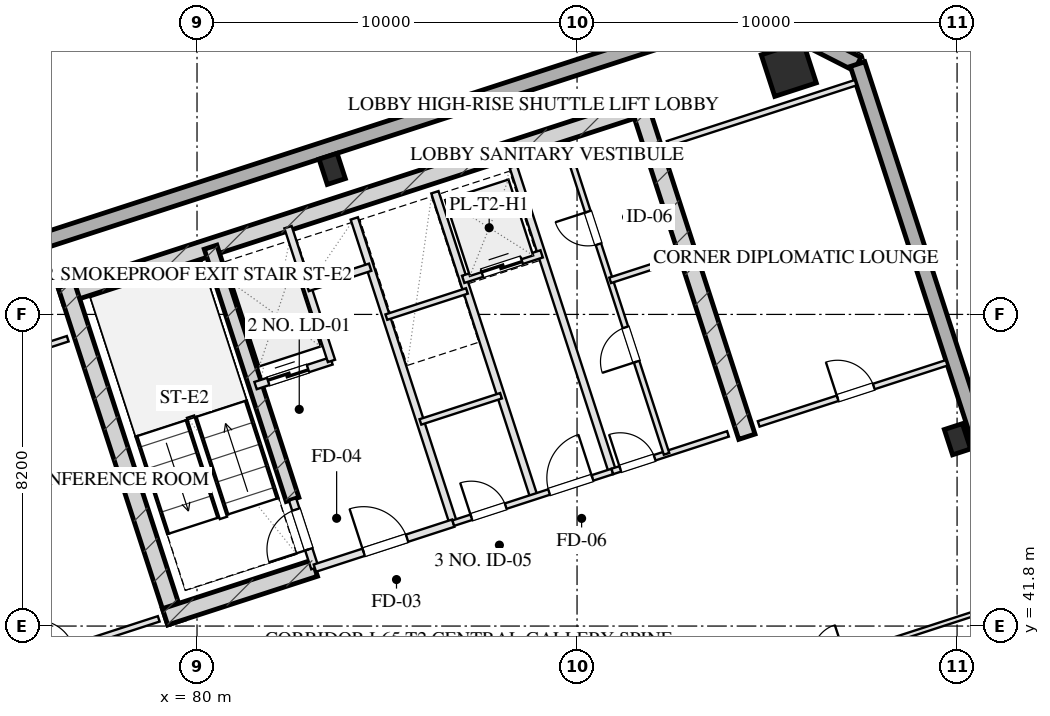
"""IFC4 building model, lengths in metres.
Left out: names, types, materials, properties, quantities, classifications, styles, units other than length and angle.
Written with IfcOpenShell. Run it as: python <this file> out.ifc"""

import sys

from ifc_helpers import new_model, si_unit, direction, frame, frame_2d, origin, origin_2d, place, context, subcontext, project, spatial, rectangle, hollow_rectangle, extrude, element, fill, save


model = new_model("IFC4")
c1 = context("Model", 3, precision=1e-05, world=origin(), true_north=direction((0.0, 1.0)))
c2 = subcontext(c1, "Body", "Model", "MODEL_VIEW")
j1 = project(units=[si_unit("LENGTHUNIT", "METRE"), si_unit("PLANEANGLEUNIT", "RADIAN")], contexts=[c1])
p1 = place(None, origin())
s1 = spatial("IfcSite", under=j1, at=p1, CompositionType="ELEMENT")
p2 = place(p1, origin())
s2 = spatial("IfcBuilding", under=s1, at=p2, CompositionType="ELEMENT")
p3 = place(p2, frame((0.0, 0.0, 240.8)))
s3 = spatial("IfcBuildingStorey", under=s2, at=p3, CompositionType="ELEMENT", Elevation=240.8)
p4 = place(p3, frame((76.415, 50.489, 0.0), z_axis=(0.0, 0.0, 1.0), x_axis=(0.951056810414, 0.309016089169, 0.0)))
e1 = element("IfcWall", 1, at=p4, inside=s3, PredefinedType="SHEAR", context=c2, shape_type="SweptSolid", body=[
    extrude(rectangle(XDim=16.25, YDim=0.45, at=frame_2d((8.125, 0.0))), origin(), (0.0, 0.0, 1.0), 3.2),
])
for number, where, z_axis, x_axis in (
    (2, (79.442, 41.899, 0.0), (0.0, 0.0, 1.0), (-0.309, 0.951, 0.0)),
    (3, (94.469, 46.781, 0.0), (0.0, 0.0, 1.0), (-0.309, 0.951, 0.0)),
):
    element("IfcWall", number, at=place(p3, frame(where, z_axis=z_axis, x_axis=x_axis)), inside=s3, PredefinedType="SHEAR", context=c2, shape_type="SweptSolid", body=[
        extrude(rectangle(XDim=9.33, YDim=0.45, at=frame_2d((4.665, 0.0))), origin(), (0.0, 0.0, 1.0), 3.2),
    ])
p5 = place(p3, frame((82.514, 45.131, 0.0), z_axis=(0.0, 0.0, 1.0), x_axis=(-0.308988790936, 0.951065679686, 0.0)))
e4 = element("IfcWall", 4, at=p5, inside=s3, PredefinedType="SHEAR", context=c2, shape_type="SweptSolid", body=[
    extrude(rectangle(XDim=6.98, YDim=0.35, at=frame_2d((3.49, 0.0))), origin(), (0.0, 0.0, 1.0), 3.2),
])
p6 = place(p3, frame((79.159, 42.043, 0.0), z_axis=(0.0, 0.0, 1.0), x_axis=(0.951047485828, 0.309044785913, 0.0)))
e5 = element("IfcWall", 5, at=p6, inside=s3, PredefinedType="SHEAR", context=c2, shape_type="SweptSolid", body=[
    extrude(rectangle(XDim=4.145, YDim=0.45, at=frame_2d((2.073, 0.0))), origin(), (0.0, 0.0, 1.0), 3.2),
])
p7 = place(p3, frame((95.572, 56.461, 0.0), z_axis=(0.0, 0.0, 1.0), x_axis=(0.951056516295, 0.309016994375, 0.0)))
e6 = element("IfcColumn", 6, at=p7, inside=s3, PredefinedType="COLUMN", context=c2, shape_type="SweptSolid", body=[
    extrude(hollow_rectangle(XDim=1.15, YDim=1.15, WallThickness=0.04, at=origin_2d()), origin(), (0.0, 0.0, 1.0), 3.201),
])
for number, where, z_axis, x_axis in (
    (7, (100.01, 46.716, 0.0), (0.0, 0.0, 1.0), (0.951, 0.309, 0.0)),
    (8, (83.557, 53.83, 0.0), (0.0, 0.0, 1.0), (0.951, 0.309, 0.0)),
):
    element("IfcColumn", number, at=place(p3, frame(where, z_axis=z_axis, x_axis=x_axis)), inside=s3, PredefinedType="COLUMN", context=c2, shape_type="SweptSolid", body=[
        extrude(hollow_rectangle(XDim=0.5, YDim=0.7, WallThickness=0.025, at=origin_2d()), origin(), (0.0, 0.0, 1.0), 3.201),
    ])
p8 = place(p3, frame((82.618, 11.414, 0.0), z_axis=(0.0, 0.0, 1.0), x_axis=(-0.309016491071, 0.951056679828, 0.0)))
e9 = element("IfcWall", 9, at=p8, inside=s3, PredefinedType="SOLIDWALL", context=c2, shape_type="SweptSolid", body=[
    extrude(rectangle(XDim=38.4, YDim=0.4, at=frame_2d((19.2, 0.0))), origin(), (0.0, 0.0, 1.0), 2.36),
])
p9 = place(p8, frame((11.825, 0.0, 0.75)))
e10 = element("IfcOpeningElement", 10, at=p9, cuts=e9, PredefinedType="OPENING", context=c2, shape_type="SweptSolid", body=[
    extrude(rectangle(XDim=1.95, YDim=1.21, at=frame_2d((0.975, 0.605))), frame((0.0, 0.21, 0.0), z_axis=(0.0, -1.0, 0.0), x_axis=(1.0, 0.0, 0.0)), (0.0, 0.0, 1.0), 0.42),
])
p10 = place(p8, frame((15.625, 0.0, 0.75)))
e11 = element("IfcOpeningElement", 11, at=p10, cuts=e9, PredefinedType="OPENING", context=c2, shape_type="SweptSolid", body=[
    extrude(rectangle(XDim=1.95, YDim=1.21, at=frame_2d((0.975, 0.605))), frame((0.0, 0.21, 0.0), z_axis=(0.0, -1.0, 0.0), x_axis=(1.0, 0.0, 0.0)), (0.0, 0.0, 1.0), 0.42),
])
p11 = place(p8, frame((21.5, 0.0, 0.0)))
e12 = element("IfcOpeningElement", 12, at=p11, cuts=e9, PredefinedType="OPENING", context=c2, shape_type="SweptSolid", body=[
    extrude(rectangle(XDim=1.1, YDim=2.15, at=frame_2d((0.55, 1.075))), frame((0.0, 0.21, 0.0), z_axis=(0.0, -1.0, 0.0), x_axis=(1.0, 0.0, 0.0)), (0.0, 0.0, 1.0), 0.42),
])
p12 = place(p3, frame((72.165, 50.706, 0.0), z_axis=(0.0, 0.0, 1.0), x_axis=(0.951058012937, 0.309012388148, 0.0)))
e13 = element("IfcWall", 13, at=p12, inside=s3, PredefinedType="SOLIDWALL", context=c2, shape_type="SweptSolid", body=[
    extrude(rectangle(XDim=23.6, YDim=0.4, at=frame_2d((11.8, 0.0))), origin(), (0.0, 0.0, 1.0), 2.36),
])
p13 = place(p3, frame((94.61, 57.999, 0.0), z_axis=(0.0, 0.0, 1.0), x_axis=(0.890979603174, -0.454043331334, 0.0)))
e14 = element("IfcWall", 14, at=p13, inside=s3, PredefinedType="SOLIDWALL", context=c2, shape_type="SweptSolid", body=[
    extrude(rectangle(XDim=3.111, YDim=0.4, at=frame_2d((1.556, 0.0))), origin(), (0.0, 0.0, 1.0), 2.36),
])
p14 = place(p3, frame((97.382, 56.586, 0.0), z_axis=(0.0, 0.0, 1.0), x_axis=(0.309016491071, -0.951056679828, 0.0)))
e15 = element("IfcWall", 15, at=p14, inside=s3, PredefinedType="SOLIDWALL", context=c2, shape_type="SweptSolid", body=[
    extrude(rectangle(XDim=38.4, YDim=0.4, at=frame_2d((19.2, 0.0))), origin(), (0.0, 0.0, 1.0), 2.36),
])
p15 = place(p14, frame((24.625, 0.0, 0.75)))
e16 = element("IfcOpeningElement", 16, at=p15, cuts=e15, PredefinedType="OPENING", context=c2, shape_type="SweptSolid", body=[
    extrude(rectangle(XDim=1.95, YDim=1.21, at=frame_2d((0.975, 0.605))), frame((0.0, 0.21, 0.0), z_axis=(0.0, -1.0, 0.0), x_axis=(1.0, 0.0, 0.0)), (0.0, 0.0, 1.0), 0.42),
])
p16 = place(p14, frame((20.825, 0.0, 0.75)))
e17 = element("IfcOpeningElement", 17, at=p16, cuts=e15, PredefinedType="OPENING", context=c2, shape_type="SweptSolid", body=[
    extrude(rectangle(XDim=1.95, YDim=1.21, at=frame_2d((0.975, 0.605))), frame((0.0, 0.21, 0.0), z_axis=(0.0, -1.0, 0.0), x_axis=(1.0, 0.0, 0.0)), (0.0, 0.0, 1.0), 0.42),
])
p17 = place(p14, frame((15.8, 0.0, 0.0)))
e18 = element("IfcOpeningElement", 18, at=p17, cuts=e15, PredefinedType="OPENING", context=c2, shape_type="SweptSolid", body=[
    extrude(rectangle(XDim=1.1, YDim=2.15, at=frame_2d((0.55, 1.075))), frame((0.0, 0.21, 0.0), z_axis=(0.0, -1.0, 0.0), x_axis=(1.0, 0.0, 0.0)), (0.0, 0.0, 1.0), 0.42),
])
p18 = place(p3, frame((83.101, 43.324, 0.0), z_axis=(0.0, 0.0, 1.0), x_axis=(-0.309048298632, 0.951046344356, 0.0)))
e19 = element("IfcWall", 19, at=p18, inside=s3, PredefinedType="PARTITIONING", context=c2, shape_type="SweptSolid", body=[
    extrude(rectangle(XDim=1.9, YDim=0.2, at=frame_2d((0.95, 0.0))), origin(), (0.0, 0.0, 1.0), 2.925),
])
p19 = place(p18, frame((0.52, 0.0, 0.0)))
e20 = element("IfcOpeningElement", 20, at=p19, cuts=e19, PredefinedType="OPENING", context=c2, shape_type="SweptSolid", body=[
    extrude(rectangle(XDim=1.1, YDim=2.05, at=frame_2d((0.55, 1.025))), frame((0.0, 0.11, 0.0), z_axis=(0.0, -1.0, 0.0), x_axis=(1.0, 0.0, 0.0)), (0.0, 0.0, 1.0), 0.22),
])
p20 = place(p3, frame((86.743, 44.508, 0.0), z_axis=(0.0, 0.0, 1.0), x_axis=(-0.309016001439, 0.951056838919, 0.0)))
e21 = element("IfcWall", 21, at=p20, inside=s3, PredefinedType="PARTITIONING", context=c2, shape_type="SweptSolid", body=[
    extrude(rectangle(XDim=8.43, YDim=0.2, at=frame_2d((4.215, 0.0))), origin(), (0.0, 0.0, 1.0), 2.925),
])
p21 = place(p3, frame((83.101, 43.324, 0.0), z_axis=(0.0, 0.0, 1.0), x_axis=(0.951052804469, 0.309028417967, 0.0)))
e22 = element("IfcWall", 22, at=p21, inside=s3, PredefinedType="PARTITIONING", context=c2, shape_type="SweptSolid", body=[
    extrude(rectangle(XDim=3.83, YDim=0.2, at=frame_2d((1.915, 0.0))), origin(), (0.0, 0.0, 1.0), 2.925),
])
p22 = place(p21, frame((1.35, 0.0, 0.0)))
e23 = element("IfcOpeningElement", 23, at=p22, cuts=e22, PredefinedType="OPENING", context=c2, shape_type="SweptSolid", body=[
    extrude(rectangle(XDim=1.2, YDim=2.05, at=frame_2d((0.6, 1.025))), frame((0.0, 0.11, 0.0), z_axis=(0.0, -1.0, 0.0), x_axis=(1.0, 0.0, 0.0)), (0.0, 0.0, 1.0), 0.22),
])
p23 = place(p3, frame((81.54, 48.127, 0.0), z_axis=(0.0, 0.0, 1.0), x_axis=(0.951062257173, 0.308999325213, 0.0)))
e24 = element("IfcWall", 24, at=p23, inside=s3, PredefinedType="PARTITIONING", context=c2, shape_type="SweptSolid", body=[
    extrude(rectangle(XDim=2.1, YDim=0.2, at=frame_2d((1.05, 0.0))), origin(), (0.0, 0.0, 1.0), 2.925),
])
p24 = place(p23, frame((0.35, 0.0, 0.0)))
e25 = element("IfcOpeningElement", 25, at=p24, cuts=e24, PredefinedType="OPENING", context=c2, shape_type="SweptSolid", body=[
    extrude(rectangle(XDim=1.1, YDim=2.05, at=frame_2d((0.55, 1.025))), frame((0.0, 0.11, 0.0), z_axis=(0.0, -1.0, 0.0), x_axis=(1.0, 0.0, 0.0)), (0.0, 0.0, 1.0), 0.22),
])
p25 = place(p3, frame((83.538, 48.776, 0.0), z_axis=(0.0, 0.0, 1.0), x_axis=(-0.3089935693, 0.951064127245, 0.0)))
e26 = element("IfcWall", 26, at=p25, inside=s3, PredefinedType="PARTITIONING", context=c2, shape_type="SweptSolid", body=[
    extrude(rectangle(XDim=3.7, YDim=0.2, at=frame_2d((1.85, 0.0))), origin(), (0.0, 0.0, 1.0), 2.925),
])
p26 = place(p3, frame((82.91, 50.707, 0.0), z_axis=(0.0, 0.0, 1.0), x_axis=(0.951041328149, 0.309063734775, 0.0)))
e27 = element("IfcWall", 27, at=p26, inside=s3, PredefinedType="PARTITIONING", context=c2, shape_type="SweptSolid", body=[
    extrude(rectangle(XDim=1.73, YDim=0.2, at=frame_2d((0.865, 0.0))), origin(), (0.0, 0.0, 1.0), 2.925),
])
p27 = place(p3, frame((90.928, 45.868, 0.0), z_axis=(0.0, 0.0, 1.0), x_axis=(-0.309042196757, 0.951048327176, 0.0)))
e28 = element("IfcWall", 28, at=p27, inside=s3, PredefinedType="PARTITIONING", context=c2, shape_type="SweptSolid", body=[
    extrude(rectangle(XDim=8.43, YDim=0.2, at=frame_2d((4.215, 0.0))), origin(), (0.0, 0.0, 1.0), 2.925),
])
p28 = place(p3, frame((88.864, 45.197, 0.0), z_axis=(0.0, 0.0, 1.0), x_axis=(-0.309007490203, 0.951059604335, 0.0)))
e29 = element("IfcWall", 29, at=p28, inside=s3, PredefinedType="PARTITIONING", context=c2, shape_type="SweptSolid", body=[
    extrude(rectangle(XDim=8.43, YDim=0.2, at=frame_2d((4.215, 0.0))), origin(), (0.0, 0.0, 1.0), 2.925),
])
p29 = place(p3, frame((86.743, 44.508, 0.0), z_axis=(0.0, 0.0, 1.0), x_axis=(0.951063829732, 0.308994485023, 0.0)))
e30 = element("IfcWall", 30, at=p29, inside=s3, PredefinedType="PARTITIONING", context=c2, shape_type="SweptSolid", body=[
    extrude(rectangle(XDim=4.4, YDim=0.15, at=frame_2d((2.2, 0.0))), origin(), (0.0, 0.0, 1.0), 2.925),
])
p30 = place(p29, frame((0.5, 0.0, 0.0)))
e31 = element("IfcOpeningElement", 31, at=p30, cuts=e30, PredefinedType="OPENING", context=c2, shape_type="SweptSolid", body=[
    extrude(rectangle(XDim=0.95, YDim=2.05, at=frame_2d((0.475, 1.025))), frame((0.0, 0.085, 0.0), z_axis=(0.0, -1.0, 0.0), x_axis=(1.0, 0.0, 0.0)), (0.0, 0.0, 1.0), 0.17),
])
p31 = place(p29, frame((2.65, 0.0, 0.0)))
e32 = element("IfcOpeningElement", 32, at=p31, cuts=e30, PredefinedType="OPENING", context=c2, shape_type="SweptSolid", body=[
    extrude(rectangle(XDim=1.2, YDim=2.05, at=frame_2d((0.6, 1.025))), frame((0.0, 0.085, 0.0), z_axis=(0.0, -1.0, 0.0), x_axis=(1.0, 0.0, 0.0)), (0.0, 0.0, 1.0), 0.17),
])
for number, where, z_axis, x_axis in (
    (33, (85.878, 47.171, 0.0), (0.0, 0.0, 1.0), (0.951, 0.309, 0.0)),
    (34, (84.982, 49.929, 0.0), (0.0, 0.0, 1.0), (0.951, 0.309, 0.0)),
):
    element("IfcWall", number, at=place(p3, frame(where, z_axis=z_axis, x_axis=x_axis)), inside=s3, PredefinedType="PARTITIONING", context=c2, shape_type="SweptSolid", body=[
        extrude(rectangle(XDim=2.23, YDim=0.15, at=frame_2d((1.115, 0.0))), origin(), (0.0, 0.0, 1.0), 2.925),
    ])
p32 = place(p3, frame((87.004, 50.922, 0.0), z_axis=(0.0, 0.0, 1.0), x_axis=(0.951041509718, 0.309063176055, 0.0)))
e35 = element("IfcWall", 35, at=p32, inside=s3, PredefinedType="PARTITIONING", context=c2, shape_type="SweptSolid", body=[
    extrude(rectangle(XDim=2.17, YDim=0.2, at=frame_2d((1.085, 0.0))), origin(), (0.0, 0.0, 1.0), 2.925),
])
p33 = place(p32, frame((0.52, 0.0, 0.0)))
e36 = element("IfcOpeningElement", 36, at=p33, cuts=e35, PredefinedType="OPENING", context=c2, shape_type="SweptSolid", body=[
    extrude(rectangle(XDim=1.1, YDim=2.05, at=frame_2d((0.55, 1.025))), frame((0.0, 0.11, 0.0), z_axis=(0.0, -1.0, 0.0), x_axis=(1.0, 0.0, 0.0)), (0.0, 0.0, 1.0), 0.22),
])
p34 = place(p3, frame((90.928, 45.868, 0.0), z_axis=(0.0, 0.0, 1.0), x_axis=(0.951059297078, 0.309008435874, 0.0)))
e37 = element("IfcWall", 37, at=p34, inside=s3, PredefinedType="PARTITIONING", context=c2, shape_type="SweptSolid", body=[
    extrude(rectangle(XDim=3.2, YDim=0.15, at=frame_2d((1.6, 0.0))), origin(), (0.0, 0.0, 1.0), 2.925),
])
p35 = place(p34, frame((0.22, 0.0, 0.0)))
e38 = element("IfcOpeningElement", 38, at=p35, cuts=e37, PredefinedType="OPENING", context=c2, shape_type="SweptSolid", body=[
    extrude(rectangle(XDim=0.95, YDim=2.05, at=frame_2d((0.475, 1.025))), frame((0.0, 0.085, 0.0), z_axis=(0.0, -1.0, 0.0), x_axis=(1.0, 0.0, 0.0)), (0.0, 0.0, 1.0), 0.17),
])
p36 = place(p3, frame((92.355, 46.331, 0.0), z_axis=(0.0, 0.0, 1.0), x_axis=(-0.309007490203, 0.951059604335, 0.0)))
e39 = element("IfcWall", 39, at=p36, inside=s3, PredefinedType="PARTITIONING", context=c2, shape_type="SweptSolid", body=[
    extrude(rectangle(XDim=8.43, YDim=0.15, at=frame_2d((4.215, 0.0))), origin(), (0.0, 0.0, 1.0), 2.925),
])
p37 = place(p36, frame((2.55, 0.0, 0.0)))
e40 = element("IfcOpeningElement", 40, at=p37, cuts=e39, PredefinedType="OPENING", context=c2, shape_type="SweptSolid", body=[
    extrude(rectangle(XDim=0.95, YDim=2.05, at=frame_2d((0.475, 1.025))), frame((0.0, 0.085, 0.0), z_axis=(0.0, -1.0, 0.0), x_axis=(1.0, 0.0, 0.0)), (0.0, 0.0, 1.0), 0.17),
])
p38 = place(p36, frame((5.8, 0.0, 0.0)))
e41 = element("IfcOpeningElement", 41, at=p38, cuts=e39, PredefinedType="OPENING", context=c2, shape_type="SweptSolid", body=[
    extrude(rectangle(XDim=0.9, YDim=2.05, at=frame_2d((0.45, 1.025))), frame((0.0, 0.085, 0.0), z_axis=(0.0, -1.0, 0.0), x_axis=(1.0, 0.0, 0.0)), (0.0, 0.0, 1.0), 0.17),
])
p39 = place(p3, frame((90.871, 50.896, 0.0), z_axis=(0.0, 0.0, 1.0), x_axis=(0.951054116971, 0.309024378638, 0.0)))
e42 = element("IfcWall", 42, at=p39, inside=s3, PredefinedType="PARTITIONING", context=c2, shape_type="SweptSolid", body=[
    extrude(rectangle(XDim=1.7, YDim=0.15, at=frame_2d((0.85, 0.0))), origin(), (0.0, 0.0, 1.0), 2.925),
])
p40 = place(p3, frame((71.081, 47.568, 0.0), z_axis=(0.0, 0.0, 1.0), x_axis=(0.951059431056, 0.309008023519, 0.0)))
e43 = element("IfcWall", 43, at=p40, inside=s3, PredefinedType="PARTITIONING", context=c2, shape_type="SweptSolid", body=[
    extrude(rectangle(XDim=5.8, YDim=0.15, at=frame_2d((2.9, 0.0))), origin(), (0.0, 0.0, 1.0), 2.925),
])
p41 = place(p3, frame((73.476, 40.197, 0.0), z_axis=(0.0, 0.0, 1.0), x_axis=(0.951059431056, 0.309008023519, 0.0)))
e44 = element("IfcWall", 44, at=p41, inside=s3, PredefinedType="PARTITIONING", context=c2, shape_type="SweptSolid", body=[
    extrude(rectangle(XDim=5.8, YDim=0.15, at=frame_2d((2.9, 0.0))), origin(), (0.0, 0.0, 1.0), 2.925),
])
p42 = place(p41, frame((2.436, 0.0, 0.0)))
e45 = element("IfcOpeningElement", 45, at=p42, cuts=e44, PredefinedType="OPENING", context=c2, shape_type="SweptSolid", body=[
    extrude(rectangle(XDim=1.0, YDim=2.05, at=frame_2d((0.5, 1.025))), frame((0.0, 0.085, 0.0), z_axis=(0.0, -1.0, 0.0), x_axis=(1.0, 0.0, 0.0)), (0.0, 0.0, 1.0), 0.17),
])
p43 = place(p3, frame((92.385, 54.49, 0.0), z_axis=(0.0, 0.0, 1.0), x_axis=(0.951055112834, 0.309021313752, 0.0)))
e46 = element("IfcWall", 46, at=p43, inside=s3, PredefinedType="PARTITIONING", context=c2, shape_type="SweptSolid", body=[
    extrude(rectangle(XDim=5.2, YDim=0.15, at=frame_2d((2.6, 0.0))), origin(), (0.0, 0.0, 1.0), 2.925),
])
p44 = place(p3, frame((94.78, 47.119, 0.0), z_axis=(0.0, 0.0, 1.0), x_axis=(0.951055112834, 0.309021313752, 0.0)))
e47 = element("IfcWall", 47, at=p44, inside=s3, PredefinedType="PARTITIONING", context=c2, shape_type="SweptSolid", body=[
    extrude(rectangle(XDim=5.2, YDim=0.15, at=frame_2d((2.6, 0.0))), origin(), (0.0, 0.0, 1.0), 2.925),
])
p45 = place(p44, frame((2.184, 0.0, 0.0)))
e48 = element("IfcOpeningElement", 48, at=p45, cuts=e47, PredefinedType="OPENING", context=c2, shape_type="SweptSolid", body=[
    extrude(rectangle(XDim=1.0, YDim=2.05, at=frame_2d((0.5, 1.025))), frame((0.0, 0.085, 0.0), z_axis=(0.0, -1.0, 0.0), x_axis=(1.0, 0.0, 0.0)), (0.0, 0.0, 1.0), 0.17),
])
p46 = place(p3, frame((87.825, 38.025, 0.0), z_axis=(0.0, 0.0, 1.0), x_axis=(0.951058110432, 0.309012088082, 0.0)))
e49 = element("IfcWall", 49, at=p46, inside=s3, PredefinedType="PARTITIONING", context=c2, shape_type="SweptSolid", body=[
    extrude(rectangle(XDim=14.625, YDim=0.12, at=frame_2d((7.312, 0.0))), origin(), (0.0, 0.0, 1.0), 2.925),
])
p47 = place(p46, frame((8.845, 0.0, 0.0)))
e50 = element("IfcOpeningElement", 50, at=p47, cuts=e49, PredefinedType="OPENING", context=c2, shape_type="SweptSolid", body=[
    extrude(rectangle(XDim=0.85, YDim=2.05, at=frame_2d((0.425, 1.025))), frame((0.0, 0.07, 0.0), z_axis=(0.0, -1.0, 0.0), x_axis=(1.0, 0.0, 0.0)), (0.0, 0.0, 1.0), 0.14),
])
p48 = place(p19, origin())
e51 = element("IfcDoor", 51, at=p48, inside=s3, OperationType="SINGLE_SWING_LEFT", PredefinedType="DOOR", context=c2, shape_type="SweptSolid", body=[
    extrude(rectangle(XDim=1.1, YDim=2.05, at=frame_2d((0.55, 1.025))), frame((0.0, 0.025, 0.0), z_axis=(0.0, -1.0, 0.0), x_axis=(1.0, 0.0, 0.0)), (0.0, 0.0, 1.0), 0.05),
])
fill(e20, e51)
p49 = place(p22, origin())
e52 = element("IfcDoor", 52, at=p49, inside=s3, OperationType="SINGLE_SWING_LEFT", PredefinedType="DOOR", context=c2, shape_type="SweptSolid", body=[
    extrude(rectangle(XDim=1.2, YDim=2.05, at=frame_2d((0.6, 1.025))), frame((0.0, 0.025, 0.0), z_axis=(0.0, -1.0, 0.0), x_axis=(1.0, 0.0, 0.0)), (0.0, 0.0, 1.0), 0.05),
])
fill(e23, e52)
p50 = place(p24, origin())
e53 = element("IfcDoor", 53, at=p50, inside=s3, OperationType="DOUBLE_DOOR_SLIDING", PredefinedType="DOOR", context=c2, shape_type="SweptSolid", body=[
    extrude(rectangle(XDim=1.1, YDim=2.05, at=frame_2d((0.55, 1.025))), frame((0.0, 0.025, 0.0), z_axis=(0.0, -1.0, 0.0), x_axis=(1.0, 0.0, 0.0)), (0.0, 0.0, 1.0), 0.05),
])
fill(e25, e53)
p51 = place(p30, origin())
e54 = element("IfcDoor", 54, at=p51, inside=s3, OperationType="SINGLE_SWING_LEFT", PredefinedType="DOOR", context=c2, shape_type="SweptSolid", body=[
    extrude(rectangle(XDim=0.95, YDim=2.05, at=frame_2d((0.475, 1.025))), frame((0.0, 0.025, 0.0), z_axis=(0.0, -1.0, 0.0), x_axis=(1.0, 0.0, 0.0)), (0.0, 0.0, 1.0), 0.05),
])
fill(e31, e54)
p52 = place(p31, origin())
e55 = element("IfcDoor", 55, at=p52, inside=s3, OperationType="SINGLE_SWING_RIGHT", PredefinedType="DOOR", context=c2, shape_type="SweptSolid", body=[
    extrude(rectangle(XDim=1.2, YDim=2.05, at=frame_2d((0.6, 1.025))), frame((0.0, 0.025, 0.0), z_axis=(0.0, -1.0, 0.0), x_axis=(1.0, 0.0, 0.0)), (0.0, 0.0, 1.0), 0.05),
])
fill(e32, e55)
p53 = place(p33, origin())
e56 = element("IfcDoor", 56, at=p53, inside=s3, OperationType="DOUBLE_DOOR_SLIDING", PredefinedType="DOOR", context=c2, shape_type="SweptSolid", body=[
    extrude(rectangle(XDim=1.1, YDim=2.05, at=frame_2d((0.55, 1.025))), frame((0.0, 0.025, 0.0), z_axis=(0.0, -1.0, 0.0), x_axis=(1.0, 0.0, 0.0)), (0.0, 0.0, 1.0), 0.05),
])
fill(e36, e56)
p54 = place(p35, origin())
e57 = element("IfcDoor", 57, at=p54, inside=s3, OperationType="SINGLE_SWING_LEFT", PredefinedType="DOOR", context=c2, shape_type="SweptSolid", body=[
    extrude(rectangle(XDim=0.95, YDim=2.05, at=frame_2d((0.475, 1.025))), frame((0.0, 0.025, 0.0), z_axis=(0.0, -1.0, 0.0), x_axis=(1.0, 0.0, 0.0)), (0.0, 0.0, 1.0), 0.05),
])
fill(e38, e57)
p55 = place(p37, origin())
e58 = element("IfcDoor", 58, at=p55, inside=s3, OperationType="SINGLE_SWING_LEFT", PredefinedType="DOOR", context=c2, shape_type="SweptSolid", body=[
    extrude(rectangle(XDim=0.95, YDim=2.05, at=frame_2d((0.475, 1.025))), frame((0.0, 0.025, 0.0), z_axis=(0.0, -1.0, 0.0), x_axis=(1.0, 0.0, 0.0)), (0.0, 0.0, 1.0), 0.05),
])
fill(e40, e58)
p56 = place(p38, origin())
e59 = element("IfcDoor", 59, at=p56, inside=s3, OperationType="SINGLE_SWING_RIGHT", PredefinedType="DOOR", context=c2, shape_type="SweptSolid", body=[
    extrude(rectangle(XDim=0.9, YDim=2.05, at=frame_2d((0.45, 1.025))), frame((0.0, 0.025, 0.0), z_axis=(0.0, -1.0, 0.0), x_axis=(1.0, 0.0, 0.0)), (0.0, 0.0, 1.0), 0.05),
])
fill(e41, e59)
p57 = place(p45, origin())
e60 = element("IfcDoor", 60, at=p57, inside=s3, OperationType="SINGLE_SWING_LEFT", PredefinedType="DOOR", context=c2, shape_type="SweptSolid", body=[
    extrude(rectangle(XDim=1.0, YDim=2.05, at=frame_2d((0.5, 1.025))), frame((0.0, 0.025, 0.0), z_axis=(0.0, -1.0, 0.0), x_axis=(1.0, 0.0, 0.0)), (0.0, 0.0, 1.0), 0.05),
])
fill(e48, e60)
save(model, sys.argv[1])
